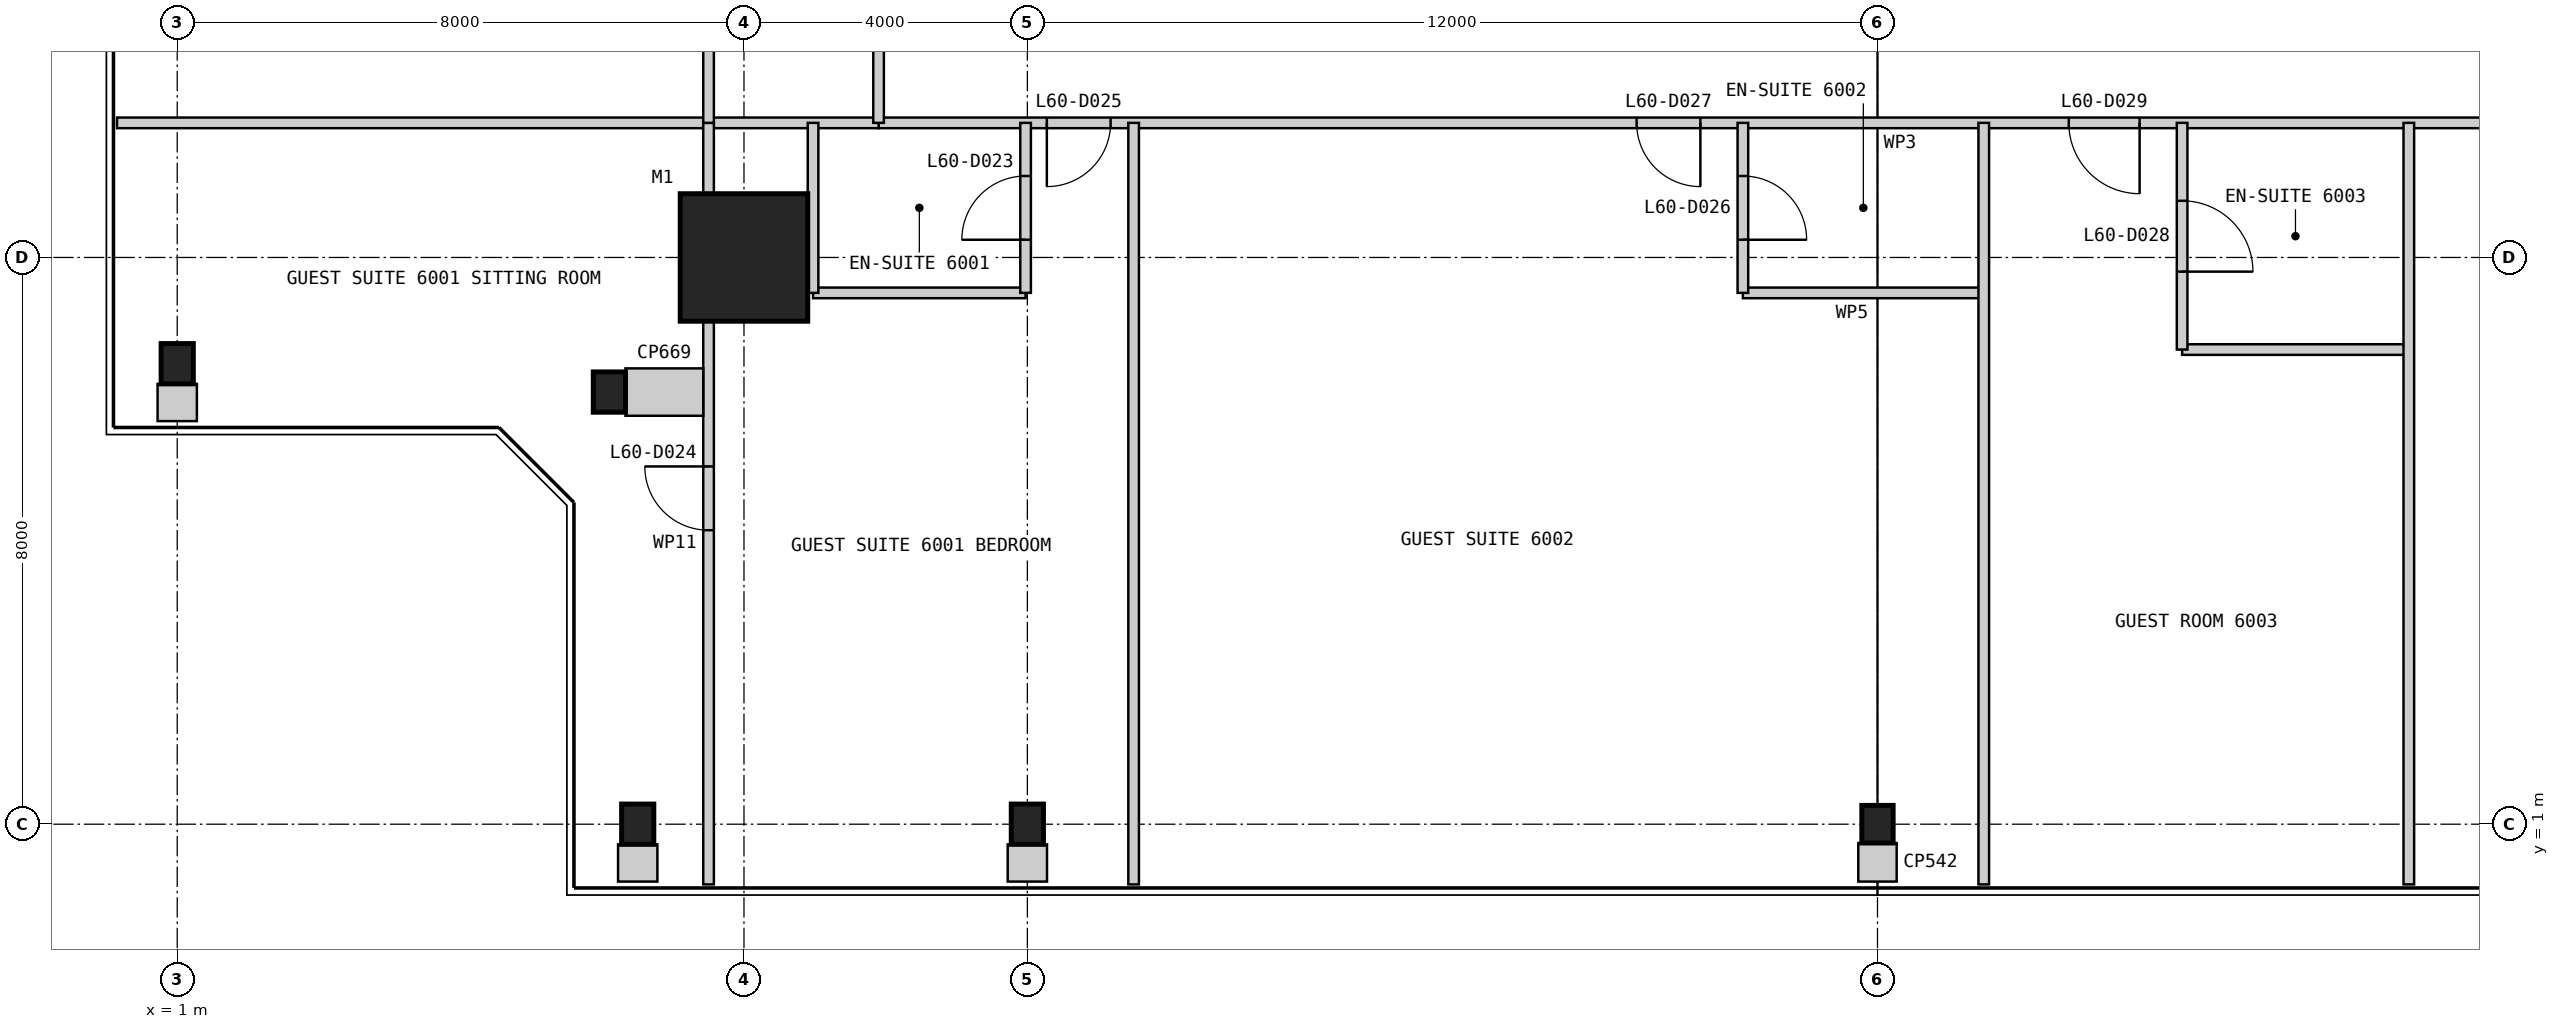
"""IFC4 building model, lengths in metres.
Left out: names, types, materials, properties, quantities, classifications, styles, units other than length and angle.
Written with IfcOpenShell. Run it as: python <this file> out.ifc"""

import sys

from ifc_helpers import new_model, si_unit, direction, frame, frame_2d, origin, origin_2d, place, context, subcontext, project, spatial, rectangle, i_section, extrude, element, fill, save


model = new_model("IFC4")
c1 = context("Model", 3, precision=1e-05, world=origin(), true_north=direction((0.0, 1.0)))
c2 = subcontext(c1, "Body", "Model", "MODEL_VIEW")
j1 = project(units=[si_unit("LENGTHUNIT", "METRE"), si_unit("PLANEANGLEUNIT", "RADIAN")], contexts=[c1])
p1 = place(None, origin())
s1 = spatial("IfcSite", under=j1, at=p1, CompositionType="ELEMENT")
p2 = place(p1, origin())
s2 = spatial("IfcBuilding", under=s1, at=p2, CompositionType="ELEMENT")
p3 = place(p2, frame((0.0, 0.0, 256.0)))
s3 = spatial("IfcBuildingStorey", under=s2, at=p3, CompositionType="ELEMENT", Elevation=256.0)
p4 = place(p3, frame((9.0, 9.0, 0.0), z_axis=(0.0, 0.0, 1.0), x_axis=(1.0, 0.0, 0.0)))
e1 = element("IfcColumn", 1, at=p4, inside=s3, PredefinedType="COLUMN", context=c2, shape_type="SweptSolid", body=[
    extrude(rectangle(XDim=1.8, YDim=1.8, at=origin_2d()), origin(), (0.0, 0.0, 1.0), 3.4),
])
for number, where, z_axis, x_axis in (
    (2, (7.5, 1.0, 0.0), (0.0, 0.0, 1.0), (1.0, 0.0, 0.0)),
    (3, (13.0, 1.0, 0.0), (0.0, 0.0, 1.0), (1.0, 0.0, 0.0)),
):
    element("IfcColumn", number, at=place(p3, frame(where, z_axis=z_axis, x_axis=x_axis)), inside=s3, PredefinedType="COLUMN", context=c2, shape_type="SweptSolid", body=[
        extrude(i_section(OverallWidth=0.455, OverallDepth=0.569, WebThickness=0.078, FlangeThickness=0.125, at=origin_2d()), origin(), (0.0, 0.0, 1.0), 3.4),
    ])
p5 = place(p3, frame((25.0, 1.0, 0.0), z_axis=(0.0, 0.0, 1.0), x_axis=(1.0, 0.0, 0.0)))
e4 = element("IfcColumn", 4, at=p5, inside=s3, PredefinedType="COLUMN", context=c2, shape_type="SweptSolid", body=[
    extrude(i_section(OverallWidth=0.442, OverallDepth=0.531, WebThickness=0.066, FlangeThickness=0.106, at=origin_2d()), origin(), (0.0, 0.0, 1.0), 3.4),
])
for number, where, z_axis, x_axis in (
    (5, (1.0, 7.5, 0.0), (0.0, 0.0, 1.0), (1.0, 0.0, 0.0)),
    (6, (7.1, 7.1, 0.0), (0.0, 0.0, 1.0), (1.0, 0.0, 0.0)),
):
    element("IfcColumn", number, at=place(p3, frame(where, z_axis=z_axis, x_axis=x_axis)), inside=s3, PredefinedType="COLUMN", context=c2, shape_type="SweptSolid", body=[
        extrude(i_section(OverallWidth=0.455, OverallDepth=0.569, WebThickness=0.078, FlangeThickness=0.125, at=origin_2d()), origin(), (0.0, 0.0, 1.0), 3.4),
    ])
p6 = place(p3, frame((10.9, 10.9, 0.0), z_axis=(0.0, 0.0, 1.0), x_axis=(1.0, 0.0, 0.0)))
e7 = element("IfcWall", 7, at=p6, inside=s3, PredefinedType="PARTITIONING", context=c2, shape_type="SweptSolid", body=[
    extrude(rectangle(XDim=28.2, YDim=0.15, at=frame_2d((14.1, 0.0))), origin(), (0.0, 0.0, 1.0), 3.25),
])
p7 = place(p6, frame((2.375, 0.0, 0.0)))
e8 = element("IfcOpeningElement", 8, at=p7, cuts=e7, PredefinedType="OPENING", context=c2, shape_type="SweptSolid", body=[
    extrude(rectangle(XDim=0.9, YDim=2.1, at=frame_2d((0.45, 1.05))), frame((0.0, 0.085, 0.0), z_axis=(0.0, -1.0, 0.0), x_axis=(1.0, 0.0, 0.0)), (0.0, 0.0, 1.0), 0.17),
])
p8 = place(p6, frame((10.7, 0.0, 0.0)))
e9 = element("IfcOpeningElement", 9, at=p8, cuts=e7, PredefinedType="OPENING", context=c2, shape_type="SweptSolid", body=[
    extrude(rectangle(XDim=0.9, YDim=2.1, at=frame_2d((0.45, 1.05))), frame((0.0, 0.085, 0.0), z_axis=(0.0, -1.0, 0.0), x_axis=(1.0, 0.0, 0.0)), (0.0, 0.0, 1.0), 0.17),
])
p9 = place(p6, frame((16.8, 0.0, 0.0)))
e10 = element("IfcOpeningElement", 10, at=p9, cuts=e7, PredefinedType="OPENING", context=c2, shape_type="SweptSolid", body=[
    extrude(rectangle(XDim=1.0, YDim=2.1, at=frame_2d((0.5, 1.05))), frame((0.0, 0.085, 0.0), z_axis=(0.0, -1.0, 0.0), x_axis=(1.0, 0.0, 0.0)), (0.0, 0.0, 1.0), 0.17),
])
p10 = place(p6, frame((23.7, 0.0, 0.0)))
e11 = element("IfcOpeningElement", 11, at=p10, cuts=e7, PredefinedType="OPENING", context=c2, shape_type="SweptSolid", body=[
    extrude(rectangle(XDim=0.9, YDim=2.1, at=frame_2d((0.45, 1.05))), frame((0.0, 0.085, 0.0), z_axis=(0.0, -1.0, 0.0), x_axis=(1.0, 0.0, 0.0)), (0.0, 0.0, 1.0), 0.17),
])
p11 = place(p3, frame((0.15, 10.9, 0.0), z_axis=(0.0, 0.0, 1.0), x_axis=(1.0, 0.0, 0.0)))
e12 = element("IfcWall", 12, at=p11, inside=s3, PredefinedType="PARTITIONING", context=c2, shape_type="SweptSolid", body=[
    extrude(rectangle(XDim=10.75, YDim=0.15, at=frame_2d((5.375, 0.0))), origin(), (0.0, 0.0, 1.0), 3.25),
])
p12 = place(p3, frame((9.975, 8.5, 0.0), z_axis=(0.0, 0.0, 1.0), x_axis=(1.0, 0.0, 0.0)))
e13 = element("IfcWall", 13, at=p12, inside=s3, PredefinedType="PARTITIONING", context=c2, shape_type="SweptSolid", body=[
    extrude(rectangle(XDim=3.0, YDim=0.15, at=frame_2d((1.5, 0.0))), origin(), (0.0, 0.0, 1.0), 3.25),
])
p13 = place(p3, frame((12.975, 8.5, 0.0), z_axis=(0.0, 0.0, 1.0), x_axis=(0.0, 1.0, 0.0)))
e14 = element("IfcWall", 14, at=p13, inside=s3, PredefinedType="PARTITIONING", context=c2, shape_type="SweptSolid", body=[
    extrude(rectangle(XDim=2.4, YDim=0.15, at=frame_2d((1.2, 0.0))), origin(), (0.0, 0.0, 1.0), 2.628),
])
p14 = place(p13, frame((0.75, 0.0, 0.0)))
e15 = element("IfcOpeningElement", 15, at=p14, cuts=e14, PredefinedType="OPENING", context=c2, shape_type="SweptSolid", body=[
    extrude(rectangle(XDim=0.9, YDim=2.1, at=frame_2d((0.45, 1.05))), frame((0.0, 0.085, 0.0), z_axis=(0.0, -1.0, 0.0), x_axis=(1.0, 0.0, 0.0)), (0.0, 0.0, 1.0), 0.17),
])
p15 = place(p3, frame((9.975, 8.5, 0.0), z_axis=(0.0, 0.0, 1.0), x_axis=(0.0, 1.0, 0.0)))
e16 = element("IfcWall", 16, at=p15, inside=s3, PredefinedType="PARTITIONING", context=c2, shape_type="SweptSolid", body=[
    extrude(rectangle(XDim=2.4, YDim=0.15, at=frame_2d((1.2, 0.0))), origin(), (0.0, 0.0, 1.0), 3.25),
])
p16 = place(p3, frame((8.5, 0.15, 0.0), z_axis=(0.0, 0.0, 1.0), x_axis=(0.0, 1.0, 0.0)))
e17 = element("IfcWall", 17, at=p16, inside=s3, PredefinedType="PARTITIONING", context=c2, shape_type="SweptSolid", body=[
    extrude(rectangle(XDim=10.75, YDim=0.15, at=frame_2d((5.375, 0.0))), origin(), (0.0, 0.0, 1.0), 3.25),
])
p17 = place(p16, frame((5.0, 0.0, 0.0)))
e18 = element("IfcOpeningElement", 18, at=p17, cuts=e17, PredefinedType="OPENING", context=c2, shape_type="SweptSolid", body=[
    extrude(rectangle(XDim=0.9, YDim=2.1, at=frame_2d((0.45, 1.05))), frame((0.0, 0.085, 0.0), z_axis=(0.0, -1.0, 0.0), x_axis=(1.0, 0.0, 0.0)), (0.0, 0.0, 1.0), 0.17),
])
p18 = place(p3, frame((14.5, 0.15, 0.0), z_axis=(0.0, 0.0, 1.0), x_axis=(0.0, 1.0, 0.0)))
e19 = element("IfcWall", 19, at=p18, inside=s3, PredefinedType="PARTITIONING", context=c2, shape_type="SweptSolid", body=[
    extrude(rectangle(XDim=10.75, YDim=0.15, at=frame_2d((5.375, 0.0))), origin(), (0.0, 0.0, 1.0), 3.25),
])
p19 = place(p3, frame((23.1, 8.5, 0.0), z_axis=(0.0, 0.0, 1.0), x_axis=(1.0, 0.0, 0.0)))
e20 = element("IfcWall", 20, at=p19, inside=s3, PredefinedType="PARTITIONING", context=c2, shape_type="SweptSolid", body=[
    extrude(rectangle(XDim=3.4, YDim=0.15, at=frame_2d((1.7, 0.0))), origin(), (0.0, 0.0, 1.0), 3.25),
])
p20 = place(p3, frame((23.1, 8.5, 0.0), z_axis=(0.0, 0.0, 1.0), x_axis=(0.0, 1.0, 0.0)))
e21 = element("IfcWall", 21, at=p20, inside=s3, PredefinedType="PARTITIONING", context=c2, shape_type="SweptSolid", body=[
    extrude(rectangle(XDim=2.4, YDim=0.15, at=frame_2d((1.2, 0.0))), origin(), (0.0, 0.0, 1.0), 3.25),
])
p21 = place(p20, frame((0.75, 0.0, 0.0)))
e22 = element("IfcOpeningElement", 22, at=p21, cuts=e21, PredefinedType="OPENING", context=c2, shape_type="SweptSolid", body=[
    extrude(rectangle(XDim=0.9, YDim=2.1, at=frame_2d((0.45, 1.05))), frame((0.0, 0.085, 0.0), z_axis=(0.0, -1.0, 0.0), x_axis=(1.0, 0.0, 0.0)), (0.0, 0.0, 1.0), 0.17),
])
p22 = place(p3, frame((26.5, 0.15, 0.0), z_axis=(0.0, 0.0, 1.0), x_axis=(0.0, 1.0, 0.0)))
e23 = element("IfcWall", 23, at=p22, inside=s3, PredefinedType="PARTITIONING", context=c2, shape_type="SweptSolid", body=[
    extrude(rectangle(XDim=10.75, YDim=0.15, at=frame_2d((5.375, 0.0))), origin(), (0.0, 0.0, 1.0), 3.25),
])
p23 = place(p3, frame((29.3, 7.7, 0.0), z_axis=(0.0, 0.0, 1.0), x_axis=(1.0, 0.0, 0.0)))
e24 = element("IfcWall", 24, at=p23, inside=s3, PredefinedType="PARTITIONING", context=c2, shape_type="SweptSolid", body=[
    extrude(rectangle(XDim=3.2, YDim=0.15, at=frame_2d((1.6, 0.0))), origin(), (0.0, 0.0, 1.0), 3.25),
])
p24 = place(p3, frame((29.3, 7.7, 0.0), z_axis=(0.0, 0.0, 1.0), x_axis=(0.0, 1.0, 0.0)))
e25 = element("IfcWall", 25, at=p24, inside=s3, PredefinedType="PARTITIONING", context=c2, shape_type="SweptSolid", body=[
    extrude(rectangle(XDim=3.2, YDim=0.15, at=frame_2d((1.6, 0.0))), origin(), (0.0, 0.0, 1.0), 3.25),
])
p25 = place(p24, frame((1.1, 0.0, 0.0)))
e26 = element("IfcOpeningElement", 26, at=p25, cuts=e25, PredefinedType="OPENING", context=c2, shape_type="SweptSolid", body=[
    extrude(rectangle(XDim=1.0, YDim=2.1, at=frame_2d((0.5, 1.05))), frame((0.0, 0.085, 0.0), z_axis=(0.0, -1.0, 0.0), x_axis=(1.0, 0.0, 0.0)), (0.0, 0.0, 1.0), 0.17),
])
p26 = place(p3, frame((32.5, 0.15, 0.0), z_axis=(0.0, 0.0, 1.0), x_axis=(0.0, 1.0, 0.0)))
e27 = element("IfcWall", 27, at=p26, inside=s3, PredefinedType="PARTITIONING", context=c2, shape_type="SweptSolid", body=[
    extrude(rectangle(XDim=10.75, YDim=0.15, at=frame_2d((5.375, 0.0))), origin(), (0.0, 0.0, 1.0), 3.25),
])
p27 = place(p3, frame((10.9, 39.1, 0.0), z_axis=(0.0, 0.0, 1.0), x_axis=(0.0, -1.0, 0.0)))
e28 = element("IfcWall", 28, at=p27, inside=s3, PredefinedType="PARTITIONING", context=c2, shape_type="SweptSolid", body=[
    extrude(rectangle(XDim=28.2, YDim=0.15, at=frame_2d((14.1, 0.0))), origin(), (0.0, 0.0, 1.0), 3.25),
])
p28 = place(p27, frame((2.375, 0.0, 0.0)))
e29 = element("IfcOpeningElement", 29, at=p28, cuts=e28, PredefinedType="OPENING", context=c2, shape_type="SweptSolid", body=[
    extrude(rectangle(XDim=0.9, YDim=2.1, at=frame_2d((0.45, 1.05))), frame((0.0, 0.085, 0.0), z_axis=(0.0, -1.0, 0.0), x_axis=(1.0, 0.0, 0.0)), (0.0, 0.0, 1.0), 0.17),
])
p29 = place(p27, frame((10.7, 0.0, 0.0)))
e30 = element("IfcOpeningElement", 30, at=p29, cuts=e28, PredefinedType="OPENING", context=c2, shape_type="SweptSolid", body=[
    extrude(rectangle(XDim=0.9, YDim=2.1, at=frame_2d((0.45, 1.05))), frame((0.0, 0.085, 0.0), z_axis=(0.0, -1.0, 0.0), x_axis=(1.0, 0.0, 0.0)), (0.0, 0.0, 1.0), 0.17),
])
p30 = place(p27, frame((17.1, 0.0, 0.0)))
e31 = element("IfcOpeningElement", 31, at=p30, cuts=e28, PredefinedType="OPENING", context=c2, shape_type="SweptSolid", body=[
    extrude(rectangle(XDim=0.9, YDim=2.1, at=frame_2d((0.45, 1.05))), frame((0.0, 0.085, 0.0), z_axis=(0.0, -1.0, 0.0), x_axis=(1.0, 0.0, 0.0)), (0.0, 0.0, 1.0), 0.17),
])
p31 = place(p27, frame((23.7, 0.0, 0.0)))
e32 = element("IfcOpeningElement", 32, at=p31, cuts=e28, PredefinedType="OPENING", context=c2, shape_type="SweptSolid", body=[
    extrude(rectangle(XDim=0.9, YDim=2.1, at=frame_2d((0.45, 1.05))), frame((0.0, 0.085, 0.0), z_axis=(0.0, -1.0, 0.0), x_axis=(1.0, 0.0, 0.0)), (0.0, 0.0, 1.0), 0.17),
])
p32 = place(p3, frame((8.5, 13.9, 0.0), z_axis=(0.0, 0.0, 1.0), x_axis=(0.0, -1.0, 0.0)))
e33 = element("IfcWall", 33, at=p32, inside=s3, PredefinedType="PARTITIONING", context=c2, shape_type="SweptSolid", body=[
    extrude(rectangle(XDim=3.0, YDim=0.15, at=frame_2d((1.5, 0.0))), origin(), (0.0, 0.0, 1.0), 3.25),
])
for number, where, z_axis, x_axis in (
    (34, (7.5, 0.19, 0.0), (0.0, 0.0, 1.0), (0.0, 1.0, 0.0)),
    (35, (1.0, 6.69, 0.0), (0.0, 0.0, 1.0), (0.0, 1.0, 0.0)),
):
    element("IfcWall", number, at=place(p3, frame(where, z_axis=z_axis, x_axis=x_axis)), inside=s3, PredefinedType="PARTITIONING", context=c2, shape_type="SweptSolid", body=[
        extrude(rectangle(XDim=0.526, YDim=0.555, at=frame_2d((0.263, 0.0))), origin(), (0.0, 0.0, 1.0), 3.25),
    ])
p33 = place(p3, frame((8.425, 7.1, 0.0), z_axis=(0.0, 0.0, 1.0), x_axis=(-1.0, 0.0, 0.0)))
e36 = element("IfcWall", 36, at=p33, inside=s3, PredefinedType="PARTITIONING", context=c2, shape_type="SweptSolid", body=[
    extrude(rectangle(XDim=1.098, YDim=0.669, at=frame_2d((0.549, 0.0))), origin(), (0.0, 0.0, 1.0), 3.25),
])
p34 = place(p3, frame((13.0, 0.19, 0.0), z_axis=(0.0, 0.0, 1.0), x_axis=(0.0, 1.0, 0.0)))
e37 = element("IfcWall", 37, at=p34, inside=s3, PredefinedType="PARTITIONING", context=c2, shape_type="SweptSolid", body=[
    extrude(rectangle(XDim=0.526, YDim=0.555, at=frame_2d((0.263, 0.0))), origin(), (0.0, 0.0, 1.0), 3.25),
])
p35 = place(p3, frame((25.0, 0.19, 0.0), z_axis=(0.0, 0.0, 1.0), x_axis=(0.0, 1.0, 0.0)))
e38 = element("IfcWall", 38, at=p35, inside=s3, PredefinedType="PARTITIONING", context=c2, shape_type="SweptSolid", body=[
    extrude(rectangle(XDim=0.545, YDim=0.542, at=frame_2d((0.272, 0.0))), origin(), (0.0, 0.0, 1.0), 3.25),
])
p36 = place(p14, origin())
e39 = element("IfcDoor", 39, at=p36, inside=s3, OperationType="SINGLE_SWING_LEFT", PredefinedType="DOOR", context=c2, shape_type="SweptSolid", body=[
    extrude(rectangle(XDim=0.9, YDim=2.1, at=frame_2d((0.45, 1.05))), frame((0.0, 0.025, 0.0), z_axis=(0.0, -1.0, 0.0), x_axis=(1.0, 0.0, 0.0)), (0.0, 0.0, 1.0), 0.05),
])
fill(e15, e39)
p37 = place(p17, origin())
e40 = element("IfcDoor", 40, at=p37, inside=s3, OperationType="SINGLE_SWING_RIGHT", PredefinedType="DOOR", context=c2, shape_type="SweptSolid", body=[
    extrude(rectangle(XDim=0.9, YDim=2.1, at=frame_2d((0.45, 1.05))), frame((0.0, 0.025, 0.0), z_axis=(0.0, -1.0, 0.0), x_axis=(1.0, 0.0, 0.0)), (0.0, 0.0, 1.0), 0.05),
])
fill(e18, e40)
p38 = place(p7, frame((0.9, 0.0, 0.0), z_axis=(0.0, 0.0, 1.0), x_axis=(-1.0, 0.0, 0.0)))
e41 = element("IfcDoor", 41, at=p38, inside=s3, OperationType="SINGLE_SWING_RIGHT", PredefinedType="DOOR", context=c2, shape_type="SweptSolid", body=[
    extrude(rectangle(XDim=0.9, YDim=2.1, at=frame_2d((0.45, 1.05))), frame((0.0, 0.025, 0.0), z_axis=(0.0, -1.0, 0.0), x_axis=(1.0, 0.0, 0.0)), (0.0, 0.0, 1.0), 0.05),
])
fill(e8, e41)
p39 = place(p21, frame((0.9, 0.0, 0.0), z_axis=(0.0, 0.0, 1.0), x_axis=(-1.0, 0.0, 0.0)))
e42 = element("IfcDoor", 42, at=p39, inside=s3, OperationType="SINGLE_SWING_RIGHT", PredefinedType="DOOR", context=c2, shape_type="SweptSolid", body=[
    extrude(rectangle(XDim=0.9, YDim=2.1, at=frame_2d((0.45, 1.05))), frame((0.0, 0.025, 0.0), z_axis=(0.0, -1.0, 0.0), x_axis=(1.0, 0.0, 0.0)), (0.0, 0.0, 1.0), 0.05),
])
fill(e22, e42)
p40 = place(p8, frame((0.9, 0.0, 0.0), z_axis=(0.0, 0.0, 1.0), x_axis=(-1.0, 0.0, 0.0)))
e43 = element("IfcDoor", 43, at=p40, inside=s3, OperationType="SINGLE_SWING_LEFT", PredefinedType="DOOR", context=c2, shape_type="SweptSolid", body=[
    extrude(rectangle(XDim=0.9, YDim=2.1, at=frame_2d((0.45, 1.05))), frame((0.0, 0.025, 0.0), z_axis=(0.0, -1.0, 0.0), x_axis=(1.0, 0.0, 0.0)), (0.0, 0.0, 1.0), 0.05),
])
fill(e9, e43)
p41 = place(p25, frame((1.0, 0.0, 0.0), z_axis=(0.0, 0.0, 1.0), x_axis=(-1.0, 0.0, 0.0)))
e44 = element("IfcDoor", 44, at=p41, inside=s3, OperationType="SINGLE_SWING_RIGHT", PredefinedType="DOOR", context=c2, shape_type="SweptSolid", body=[
    extrude(rectangle(XDim=1.0, YDim=2.1, at=frame_2d((0.5, 1.05))), frame((0.0, 0.025, 0.0), z_axis=(0.0, -1.0, 0.0), x_axis=(1.0, 0.0, 0.0)), (0.0, 0.0, 1.0), 0.05),
])
fill(e26, e44)
p42 = place(p9, frame((1.0, 0.0, 0.0), z_axis=(0.0, 0.0, 1.0), x_axis=(-1.0, 0.0, 0.0)))
e45 = element("IfcDoor", 45, at=p42, inside=s3, OperationType="SINGLE_SWING_LEFT", PredefinedType="DOOR", context=c2, shape_type="SweptSolid", body=[
    extrude(rectangle(XDim=1.0, YDim=2.1, at=frame_2d((0.5, 1.05))), frame((0.0, 0.025, 0.0), z_axis=(0.0, -1.0, 0.0), x_axis=(1.0, 0.0, 0.0)), (0.0, 0.0, 1.0), 0.05),
])
fill(e10, e45)
save(model, sys.argv[1])
